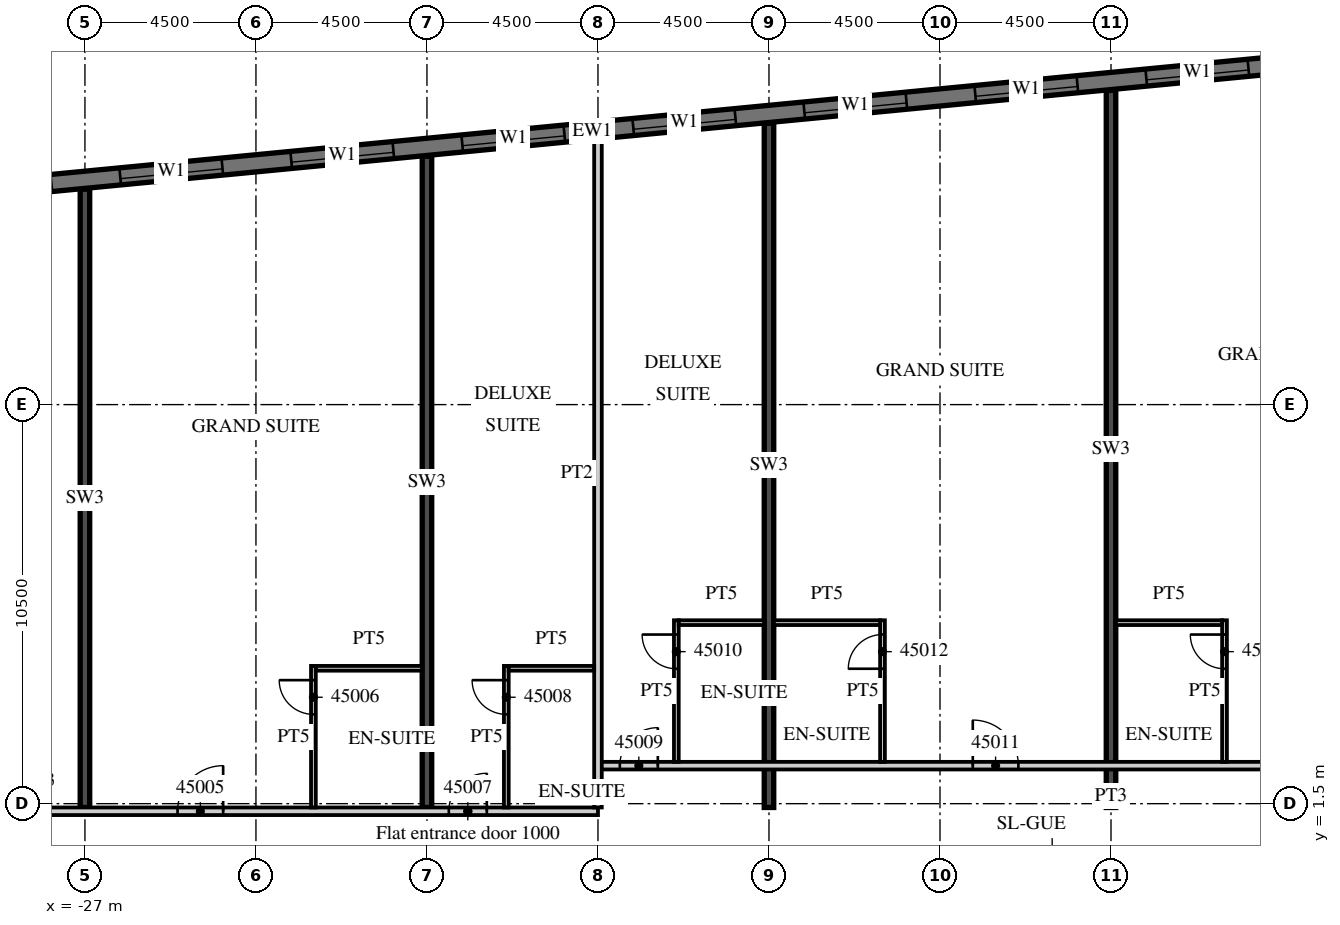
"""IFC4 building model, lengths in metres.
Left out: names, types, materials, properties, quantities, classifications, styles, units other than length and angle.
Written with IfcOpenShell. Run it as: python <this file> out.ifc"""

import sys

from ifc_helpers import new_model, si_unit, direction, frame, frame_2d, origin, place, context, subcontext, project, spatial, rectangle, extrude, element, fill, save


model = new_model("IFC4")
c1 = context("Model", 3, precision=1e-05, world=origin(), true_north=direction((0.0, 1.0)))
c2 = subcontext(c1, "Body", "Model", "MODEL_VIEW")
j1 = project(units=[si_unit("LENGTHUNIT", "METRE"), si_unit("PLANEANGLEUNIT", "RADIAN")], contexts=[c1])
p1 = place(None, origin())
s1 = spatial("IfcSite", under=j1, at=p1, CompositionType="ELEMENT")
p2 = place(p1, origin())
s2 = spatial("IfcBuilding", under=s1, at=p2, CompositionType="ELEMENT")
p3 = place(p2, frame((0.0, 0.0, 190.0)))
s3 = spatial("IfcBuildingStorey", under=s2, at=p3, CompositionType="ELEMENT", Elevation=190.0)
p4 = place(p3, frame((-27.0, 1.4, 0.0), z_axis=(0.0, 0.0, 1.0), x_axis=(0.0, 1.0, 0.0)))
e1 = element("IfcWall", 1, at=p4, inside=s3, PredefinedType="SHEAR", context=c2, shape_type="SweptSolid", body=[
    extrude(rectangle(XDim=16.268, YDim=0.25, at=frame_2d((8.134, 0.0))), origin(), (0.0, 0.0, 1.0), 3.3),
])
p5 = place(p3, frame((-18.0, 1.4, 0.0), z_axis=(0.0, 0.0, 1.0), x_axis=(0.0, 1.0, 0.0)))
e2 = element("IfcWall", 2, at=p5, inside=s3, PredefinedType="SHEAR", context=c2, shape_type="SweptSolid", body=[
    extrude(rectangle(XDim=17.134, YDim=0.25, at=frame_2d((8.567, 0.0))), origin(), (0.0, 0.0, 1.0), 3.3),
])
p6 = place(p3, frame((-9.0, 1.4, 0.0), z_axis=(0.0, 0.0, 1.0), x_axis=(0.0, 1.0, 0.0)))
e3 = element("IfcWall", 3, at=p6, inside=s3, PredefinedType="SHEAR", context=c2, shape_type="SweptSolid", body=[
    extrude(rectangle(XDim=18.001, YDim=0.25, at=frame_2d((9.0, 0.0))), origin(), (0.0, 0.0, 1.0), 3.3),
])
p7 = place(p3, frame((0.0, 1.4, 0.0), z_axis=(0.0, 0.0, 1.0), x_axis=(0.0, 1.0, 0.0)))
e4 = element("IfcWall", 4, at=p7, inside=s3, PredefinedType="SHEAR", context=c2, shape_type="SweptSolid", body=[
    extrude(rectangle(XDim=18.867, YDim=0.25, at=frame_2d((9.434, 0.0))), origin(), (0.0, 0.0, 1.0), 3.3),
])
p8 = place(p3, frame((13.521, 21.817, 0.0), z_axis=(0.0, 0.0, 1.0), x_axis=(-0.995396508751, -0.095842529008, 0.0)))
e5 = element("IfcWall", 5, at=p8, inside=s3, PredefinedType="SOLIDWALL", context=c2, shape_type="SweptSolid", body=[
    extrude(rectangle(XDim=54.591, YDim=0.45, at=frame_2d((27.296, 0.0))), origin(), (0.0, 0.0, 1.0), 3.02),
])
p9 = place(p8, frame((0.91, 0.0, 0.45)))
e6 = element("IfcOpeningElement", 6, at=p9, cuts=e5, PredefinedType="OPENING", context=c2, shape_type="SweptSolid", body=[
    extrude(rectangle(XDim=2.7, YDim=2.25, at=frame_2d((1.35, 1.125))), frame((0.0, 0.235, 0.0), z_axis=(0.0, -1.0, 0.0), x_axis=(1.0, 0.0, 0.0)), (0.0, 0.0, 1.0), 0.47),
])
p10 = place(p8, frame((5.431, 0.0, 0.45)))
e7 = element("IfcOpeningElement", 7, at=p10, cuts=e5, PredefinedType="OPENING", context=c2, shape_type="SweptSolid", body=[
    extrude(rectangle(XDim=2.7, YDim=2.25, at=frame_2d((1.35, 1.125))), frame((0.0, 0.235, 0.0), z_axis=(0.0, -1.0, 0.0), x_axis=(1.0, 0.0, 0.0)), (0.0, 0.0, 1.0), 0.47),
])
p11 = place(p8, frame((9.952, 0.0, 0.45)))
e8 = element("IfcOpeningElement", 8, at=p11, cuts=e5, PredefinedType="OPENING", context=c2, shape_type="SweptSolid", body=[
    extrude(rectangle(XDim=2.7, YDim=2.25, at=frame_2d((1.35, 1.125))), frame((0.0, 0.235, 0.0), z_axis=(0.0, -1.0, 0.0), x_axis=(1.0, 0.0, 0.0)), (0.0, 0.0, 1.0), 0.47),
])
p12 = place(p8, frame((14.473, 0.0, 0.45)))
e9 = element("IfcOpeningElement", 9, at=p12, cuts=e5, PredefinedType="OPENING", context=c2, shape_type="SweptSolid", body=[
    extrude(rectangle(XDim=2.7, YDim=2.25, at=frame_2d((1.35, 1.125))), frame((0.0, 0.235, 0.0), z_axis=(0.0, -1.0, 0.0), x_axis=(1.0, 0.0, 0.0)), (0.0, 0.0, 1.0), 0.47),
])
p13 = place(p8, frame((18.994, 0.0, 0.45)))
e10 = element("IfcOpeningElement", 10, at=p13, cuts=e5, PredefinedType="OPENING", context=c2, shape_type="SweptSolid", body=[
    extrude(rectangle(XDim=2.7, YDim=2.25, at=frame_2d((1.35, 1.125))), frame((0.0, 0.235, 0.0), z_axis=(0.0, -1.0, 0.0), x_axis=(1.0, 0.0, 0.0)), (0.0, 0.0, 1.0), 0.47),
])
p14 = place(p8, frame((23.514, 0.0, 0.45)))
e11 = element("IfcOpeningElement", 11, at=p14, cuts=e5, PredefinedType="OPENING", context=c2, shape_type="SweptSolid", body=[
    extrude(rectangle(XDim=2.7, YDim=2.25, at=frame_2d((1.35, 1.125))), frame((0.0, 0.235, 0.0), z_axis=(0.0, -1.0, 0.0), x_axis=(1.0, 0.0, 0.0)), (0.0, 0.0, 1.0), 0.47),
])
p15 = place(p8, frame((28.035, 0.0, 0.45)))
e12 = element("IfcOpeningElement", 12, at=p15, cuts=e5, PredefinedType="OPENING", context=c2, shape_type="SweptSolid", body=[
    extrude(rectangle(XDim=2.7, YDim=2.25, at=frame_2d((1.35, 1.125))), frame((0.0, 0.235, 0.0), z_axis=(0.0, -1.0, 0.0), x_axis=(1.0, 0.0, 0.0)), (0.0, 0.0, 1.0), 0.47),
])
p16 = place(p8, frame((32.556, 0.0, 0.45)))
e13 = element("IfcOpeningElement", 13, at=p16, cuts=e5, PredefinedType="OPENING", context=c2, shape_type="SweptSolid", body=[
    extrude(rectangle(XDim=2.7, YDim=2.25, at=frame_2d((1.35, 1.125))), frame((0.0, 0.235, 0.0), z_axis=(0.0, -1.0, 0.0), x_axis=(1.0, 0.0, 0.0)), (0.0, 0.0, 1.0), 0.47),
])
p17 = place(p8, frame((37.077, 0.0, 0.45)))
e14 = element("IfcOpeningElement", 14, at=p17, cuts=e5, PredefinedType="OPENING", context=c2, shape_type="SweptSolid", body=[
    extrude(rectangle(XDim=2.7, YDim=2.25, at=frame_2d((1.35, 1.125))), frame((0.0, 0.235, 0.0), z_axis=(0.0, -1.0, 0.0), x_axis=(1.0, 0.0, 0.0)), (0.0, 0.0, 1.0), 0.47),
])
p18 = place(p8, frame((41.598, 0.0, 0.45)))
e15 = element("IfcOpeningElement", 15, at=p18, cuts=e5, PredefinedType="OPENING", context=c2, shape_type="SweptSolid", body=[
    extrude(rectangle(XDim=2.7, YDim=2.25, at=frame_2d((1.35, 1.125))), frame((0.0, 0.235, 0.0), z_axis=(0.0, -1.0, 0.0), x_axis=(1.0, 0.0, 0.0)), (0.0, 0.0, 1.0), 0.47),
])
p19 = place(p8, frame((46.118, 0.0, 0.45)))
e16 = element("IfcOpeningElement", 16, at=p19, cuts=e5, PredefinedType="OPENING", context=c2, shape_type="SweptSolid", body=[
    extrude(rectangle(XDim=2.7, YDim=2.25, at=frame_2d((1.35, 1.125))), frame((0.0, 0.235, 0.0), z_axis=(0.0, -1.0, 0.0), x_axis=(1.0, 0.0, 0.0)), (0.0, 0.0, 1.0), 0.47),
])
p20 = place(p8, frame((50.629, 0.0, 0.45)))
e17 = element("IfcOpeningElement", 17, at=p20, cuts=e5, PredefinedType="OPENING", context=c2, shape_type="SweptSolid", body=[
    extrude(rectangle(XDim=2.7, YDim=2.25, at=frame_2d((1.35, 1.125))), frame((0.0, 0.235, 0.0), z_axis=(0.0, -1.0, 0.0), x_axis=(1.0, 0.0, 0.0)), (0.0, 0.0, 1.0), 0.47),
])
p21 = place(p3, frame((-42.913, 1.3, 0.0), z_axis=(0.0, 0.0, 1.0), x_axis=(1.0, 0.0, 0.0)))
e18 = element("IfcWall", 18, at=p21, inside=s3, PredefinedType="PARTITIONING", context=c2, shape_type="SweptSolid", body=[
    extrude(rectangle(XDim=29.413, YDim=0.2, at=frame_2d((14.707, 0.0))), origin(), (0.0, 0.0, 1.0), 3.02),
])
p22 = place(p21, frame((1.406, 0.0, 0.0)))
e19 = element("IfcOpeningElement", 19, at=p22, cuts=e18, PredefinedType="OPENING", context=c2, shape_type="SweptSolid", body=[
    extrude(rectangle(XDim=1.2, YDim=2.1, at=frame_2d((0.6, 1.05))), frame((0.0, 0.11, 0.0), z_axis=(0.0, -1.0, 0.0), x_axis=(1.0, 0.0, 0.0)), (0.0, 0.0, 1.0), 0.22),
])
p23 = place(p21, frame((12.275, 0.0, 0.0)))
e20 = element("IfcOpeningElement", 20, at=p23, cuts=e18, PredefinedType="OPENING", context=c2, shape_type="SweptSolid", body=[
    extrude(rectangle(XDim=1.2, YDim=2.1, at=frame_2d((0.6, 1.05))), frame((0.0, 0.11, 0.0), z_axis=(0.0, -1.0, 0.0), x_axis=(1.0, 0.0, 0.0)), (0.0, 0.0, 1.0), 0.22),
])
p24 = place(p21, frame((18.35, 0.0, 0.0)))
e21 = element("IfcOpeningElement", 21, at=p24, cuts=e18, PredefinedType="OPENING", context=c2, shape_type="SweptSolid", body=[
    extrude(rectangle(XDim=1.2, YDim=2.1, at=frame_2d((0.6, 1.05))), frame((0.0, 0.11, 0.0), z_axis=(0.0, -1.0, 0.0), x_axis=(1.0, 0.0, 0.0)), (0.0, 0.0, 1.0), 0.22),
])
p25 = place(p21, frame((25.488, 0.0, 0.0)))
e22 = element("IfcOpeningElement", 22, at=p25, cuts=e18, PredefinedType="OPENING", context=c2, shape_type="SweptSolid", body=[
    extrude(rectangle(XDim=1.0, YDim=2.1, at=frame_2d((0.5, 1.05))), frame((0.0, 0.11, 0.0), z_axis=(0.0, -1.0, 0.0), x_axis=(1.0, 0.0, 0.0)), (0.0, 0.0, 1.0), 0.22),
])
p26 = place(p3, frame((-13.5, 2.5, 0.0), z_axis=(0.0, 0.0, 1.0), x_axis=(1.0, 0.0, 0.0)))
e23 = element("IfcWall", 23, at=p26, inside=s3, PredefinedType="PARTITIONING", context=c2, shape_type="SweptSolid", body=[
    extrude(rectangle(XDim=27.0, YDim=0.2, at=frame_2d((13.5, 0.0))), origin(), (0.0, 0.0, 1.0), 3.02),
])
p27 = place(p26, frame((0.575, 0.0, 0.0)))
e24 = element("IfcOpeningElement", 24, at=p27, cuts=e23, PredefinedType="OPENING", context=c2, shape_type="SweptSolid", body=[
    extrude(rectangle(XDim=1.0, YDim=2.1, at=frame_2d((0.5, 1.05))), frame((0.0, 0.11, 0.0), z_axis=(0.0, -1.0, 0.0), x_axis=(1.0, 0.0, 0.0)), (0.0, 0.0, 1.0), 0.22),
])
p28 = place(p26, frame((9.863, 0.0, 0.0)))
e25 = element("IfcOpeningElement", 25, at=p28, cuts=e23, PredefinedType="OPENING", context=c2, shape_type="SweptSolid", body=[
    extrude(rectangle(XDim=1.2, YDim=2.1, at=frame_2d((0.6, 1.05))), frame((0.0, 0.11, 0.0), z_axis=(0.0, -1.0, 0.0), x_axis=(1.0, 0.0, 0.0)), (0.0, 0.0, 1.0), 0.22),
])
p29 = place(p26, frame((18.862, 0.0, 0.0)))
e26 = element("IfcOpeningElement", 26, at=p29, cuts=e23, PredefinedType="OPENING", context=c2, shape_type="SweptSolid", body=[
    extrude(rectangle(XDim=1.2, YDim=2.1, at=frame_2d((0.6, 1.05))), frame((0.0, 0.11, 0.0), z_axis=(0.0, -1.0, 0.0), x_axis=(1.0, 0.0, 0.0)), (0.0, 0.0, 1.0), 0.22),
])
p30 = place(p26, frame((25.425, 0.0, 0.0)))
e27 = element("IfcOpeningElement", 27, at=p30, cuts=e23, PredefinedType="OPENING", context=c2, shape_type="SweptSolid", body=[
    extrude(rectangle(XDim=1.0, YDim=2.1, at=frame_2d((0.5, 1.05))), frame((0.0, 0.11, 0.0), z_axis=(0.0, -1.0, 0.0), x_axis=(1.0, 0.0, 0.0)), (0.0, 0.0, 1.0), 0.22),
])
p31 = place(p3, frame((-20.988, 1.4, 0.0), z_axis=(0.0, 0.0, 1.0), x_axis=(0.0, 1.0, 0.0)))
e28 = element("IfcWall", 28, at=p31, inside=s3, PredefinedType="PARTITIONING", context=c2, shape_type="SweptSolid", body=[
    extrude(rectangle(XDim=3.725, YDim=0.125, at=frame_2d((1.863, 0.0))), origin(), (0.0, 0.0, 1.0), 3.02),
])
p32 = place(p31, frame((2.45, 0.0, 0.0)))
e29 = element("IfcOpeningElement", 29, at=p32, cuts=e28, PredefinedType="OPENING", context=c2, shape_type="SweptSolid", body=[
    extrude(rectangle(XDim=0.9, YDim=2.1, at=frame_2d((0.45, 1.05))), frame((0.0, 0.073, 0.0), z_axis=(0.0, -1.0, 0.0), x_axis=(1.0, 0.0, 0.0)), (0.0, 0.0, 1.0), 0.145),
])
p33 = place(p3, frame((-20.925, 5.062, 0.0), z_axis=(0.0, 0.0, 1.0), x_axis=(1.0, 0.0, 0.0)))
e30 = element("IfcWall", 30, at=p33, inside=s3, PredefinedType="PARTITIONING", context=c2, shape_type="SweptSolid", body=[
    extrude(rectangle(XDim=2.8, YDim=0.125, at=frame_2d((1.4, 0.0))), origin(), (0.0, 0.0, 1.0), 3.02),
])
p34 = place(p3, frame((-13.5, 1.4, 0.0), z_axis=(0.0, 0.0, 1.0), x_axis=(0.0, 1.0, 0.0)))
e31 = element("IfcWall", 31, at=p34, inside=s3, PredefinedType="PARTITIONING", context=c2, shape_type="SweptSolid", body=[
    extrude(rectangle(XDim=17.59, YDim=0.2, at=frame_2d((8.795, 0.0))), origin(), (0.0, 0.0, 1.0), 3.02),
])
p35 = place(p3, frame((-15.912, 1.4, 0.0), z_axis=(0.0, 0.0, 1.0), x_axis=(0.0, 1.0, 0.0)))
e32 = element("IfcWall", 32, at=p35, inside=s3, PredefinedType="PARTITIONING", context=c2, shape_type="SweptSolid", body=[
    extrude(rectangle(XDim=3.725, YDim=0.125, at=frame_2d((1.863, 0.0))), origin(), (0.0, 0.0, 1.0), 3.02),
])
p36 = place(p35, frame((2.45, 0.0, 0.0)))
e33 = element("IfcOpeningElement", 33, at=p36, cuts=e32, PredefinedType="OPENING", context=c2, shape_type="SweptSolid", body=[
    extrude(rectangle(XDim=0.9, YDim=2.1, at=frame_2d((0.45, 1.05))), frame((0.0, 0.073, 0.0), z_axis=(0.0, -1.0, 0.0), x_axis=(1.0, 0.0, 0.0)), (0.0, 0.0, 1.0), 0.145),
])
p37 = place(p3, frame((-15.85, 5.062, 0.0), z_axis=(0.0, 0.0, 1.0), x_axis=(1.0, 0.0, 0.0)))
e34 = element("IfcWall", 34, at=p37, inside=s3, PredefinedType="PARTITIONING", context=c2, shape_type="SweptSolid", body=[
    extrude(rectangle(XDim=2.25, YDim=0.125, at=frame_2d((1.125, 0.0))), origin(), (0.0, 0.0, 1.0), 3.02),
])
p38 = place(p3, frame((-11.438, 2.6, 0.0), z_axis=(0.0, 0.0, 1.0), x_axis=(0.0, 1.0, 0.0)))
e35 = element("IfcWall", 35, at=p38, inside=s3, PredefinedType="PARTITIONING", context=c2, shape_type="SweptSolid", body=[
    extrude(rectangle(XDim=3.725, YDim=0.125, at=frame_2d((1.862, 0.0))), origin(), (0.0, 0.0, 1.0), 3.02),
])
p39 = place(p38, frame((2.45, 0.0, 0.0)))
e36 = element("IfcOpeningElement", 36, at=p39, cuts=e35, PredefinedType="OPENING", context=c2, shape_type="SweptSolid", body=[
    extrude(rectangle(XDim=0.9, YDim=2.1, at=frame_2d((0.45, 1.05))), frame((0.0, 0.073, 0.0), z_axis=(0.0, -1.0, 0.0), x_axis=(1.0, 0.0, 0.0)), (0.0, 0.0, 1.0), 0.145),
])
p40 = place(p3, frame((-11.375, 6.263, 0.0), z_axis=(0.0, 0.0, 1.0), x_axis=(1.0, 0.0, 0.0)))
e37 = element("IfcWall", 37, at=p40, inside=s3, PredefinedType="PARTITIONING", context=c2, shape_type="SweptSolid", body=[
    extrude(rectangle(XDim=2.25, YDim=0.125, at=frame_2d((1.125, 0.0))), origin(), (0.0, 0.0, 1.0), 3.02),
])
p41 = place(p3, frame((-6.013, 2.6, 0.0), z_axis=(0.0, 0.0, 1.0), x_axis=(0.0, 1.0, 0.0)))
e38 = element("IfcWall", 38, at=p41, inside=s3, PredefinedType="PARTITIONING", context=c2, shape_type="SweptSolid", body=[
    extrude(rectangle(XDim=3.725, YDim=0.125, at=frame_2d((1.862, 0.0))), origin(), (0.0, 0.0, 1.0), 3.02),
])
p42 = place(p41, frame((2.45, 0.0, 0.0)))
e39 = element("IfcOpeningElement", 39, at=p42, cuts=e38, PredefinedType="OPENING", context=c2, shape_type="SweptSolid", body=[
    extrude(rectangle(XDim=0.9, YDim=2.1, at=frame_2d((0.45, 1.05))), frame((0.0, 0.073, 0.0), z_axis=(0.0, -1.0, 0.0), x_axis=(1.0, 0.0, 0.0)), (0.0, 0.0, 1.0), 0.145),
])
p43 = place(p3, frame((-8.875, 6.263, 0.0), z_axis=(0.0, 0.0, 1.0), x_axis=(1.0, 0.0, 0.0)))
e40 = element("IfcWall", 40, at=p43, inside=s3, PredefinedType="PARTITIONING", context=c2, shape_type="SweptSolid", body=[
    extrude(rectangle(XDim=2.8, YDim=0.125, at=frame_2d((1.4, 0.0))), origin(), (0.0, 0.0, 1.0), 3.02),
])
p44 = place(p3, frame((2.987, 2.6, 0.0), z_axis=(0.0, 0.0, 1.0), x_axis=(0.0, 1.0, 0.0)))
e41 = element("IfcWall", 41, at=p44, inside=s3, PredefinedType="PARTITIONING", context=c2, shape_type="SweptSolid", body=[
    extrude(rectangle(XDim=3.725, YDim=0.125, at=frame_2d((1.862, 0.0))), origin(), (0.0, 0.0, 1.0), 3.02),
])
p45 = place(p44, frame((2.45, 0.0, 0.0)))
e42 = element("IfcOpeningElement", 42, at=p45, cuts=e41, PredefinedType="OPENING", context=c2, shape_type="SweptSolid", body=[
    extrude(rectangle(XDim=0.9, YDim=2.1, at=frame_2d((0.45, 1.05))), frame((0.0, 0.073, 0.0), z_axis=(0.0, -1.0, 0.0), x_axis=(1.0, 0.0, 0.0)), (0.0, 0.0, 1.0), 0.145),
])
p46 = place(p3, frame((0.125, 6.263, 0.0), z_axis=(0.0, 0.0, 1.0), x_axis=(1.0, 0.0, 0.0)))
e43 = element("IfcWall", 43, at=p46, inside=s3, PredefinedType="PARTITIONING", context=c2, shape_type="SweptSolid", body=[
    extrude(rectangle(XDim=2.8, YDim=0.125, at=frame_2d((1.4, 0.0))), origin(), (0.0, 0.0, 1.0), 3.02),
])
p47 = place(p11, origin())
e44 = element("IfcWindow", 44, at=p47, inside=s3, PartitioningType="SINGLE_PANEL", PredefinedType="WINDOW", context=c2, shape_type="SweptSolid", body=[
    extrude(rectangle(XDim=2.7, YDim=2.25, at=frame_2d((1.35, 1.125))), frame((0.0, 0.09, 0.0), z_axis=(0.0, -1.0, 0.0), x_axis=(1.0, 0.0, 0.0)), (0.0, 0.0, 1.0), 0.06),
])
fill(e8, e44)
p48 = place(p12, origin())
e45 = element("IfcWindow", 45, at=p48, inside=s3, PartitioningType="SINGLE_PANEL", PredefinedType="WINDOW", context=c2, shape_type="SweptSolid", body=[
    extrude(rectangle(XDim=2.7, YDim=2.25, at=frame_2d((1.35, 1.125))), frame((0.0, 0.09, 0.0), z_axis=(0.0, -1.0, 0.0), x_axis=(1.0, 0.0, 0.0)), (0.0, 0.0, 1.0), 0.06),
])
fill(e9, e45)
p49 = place(p13, origin())
e46 = element("IfcWindow", 46, at=p49, inside=s3, PartitioningType="SINGLE_PANEL", PredefinedType="WINDOW", context=c2, shape_type="SweptSolid", body=[
    extrude(rectangle(XDim=2.7, YDim=2.25, at=frame_2d((1.35, 1.125))), frame((0.0, 0.09, 0.0), z_axis=(0.0, -1.0, 0.0), x_axis=(1.0, 0.0, 0.0)), (0.0, 0.0, 1.0), 0.06),
])
fill(e10, e46)
p50 = place(p14, origin())
e47 = element("IfcWindow", 47, at=p50, inside=s3, PartitioningType="SINGLE_PANEL", PredefinedType="WINDOW", context=c2, shape_type="SweptSolid", body=[
    extrude(rectangle(XDim=2.7, YDim=2.25, at=frame_2d((1.35, 1.125))), frame((0.0, 0.09, 0.0), z_axis=(0.0, -1.0, 0.0), x_axis=(1.0, 0.0, 0.0)), (0.0, 0.0, 1.0), 0.06),
])
fill(e11, e47)
p51 = place(p15, origin())
e48 = element("IfcWindow", 48, at=p51, inside=s3, PartitioningType="SINGLE_PANEL", PredefinedType="WINDOW", context=c2, shape_type="SweptSolid", body=[
    extrude(rectangle(XDim=2.7, YDim=2.25, at=frame_2d((1.35, 1.125))), frame((0.0, 0.09, 0.0), z_axis=(0.0, -1.0, 0.0), x_axis=(1.0, 0.0, 0.0)), (0.0, 0.0, 1.0), 0.06),
])
fill(e12, e48)
p52 = place(p16, origin())
e49 = element("IfcWindow", 49, at=p52, inside=s3, PartitioningType="SINGLE_PANEL", PredefinedType="WINDOW", context=c2, shape_type="SweptSolid", body=[
    extrude(rectangle(XDim=2.7, YDim=2.25, at=frame_2d((1.35, 1.125))), frame((0.0, 0.09, 0.0), z_axis=(0.0, -1.0, 0.0), x_axis=(1.0, 0.0, 0.0)), (0.0, 0.0, 1.0), 0.06),
])
fill(e13, e49)
p53 = place(p17, origin())
e50 = element("IfcWindow", 50, at=p53, inside=s3, PartitioningType="SINGLE_PANEL", PredefinedType="WINDOW", context=c2, shape_type="SweptSolid", body=[
    extrude(rectangle(XDim=2.7, YDim=2.25, at=frame_2d((1.35, 1.125))), frame((0.0, 0.09, 0.0), z_axis=(0.0, -1.0, 0.0), x_axis=(1.0, 0.0, 0.0)), (0.0, 0.0, 1.0), 0.06),
])
fill(e14, e50)
p54 = place(p24, origin())
e51 = element("IfcDoor", 51, at=p54, inside=s3, OperationType="SINGLE_SWING_RIGHT", PredefinedType="DOOR", context=c2, shape_type="SweptSolid", body=[
    extrude(rectangle(XDim=1.2, YDim=2.1, at=frame_2d((0.6, 1.05))), frame((0.0, 0.025, 0.0), z_axis=(0.0, -1.0, 0.0), x_axis=(1.0, 0.0, 0.0)), (0.0, 0.0, 1.0), 0.05),
])
fill(e21, e51)
p55 = place(p32, origin())
e52 = element("IfcDoor", 52, at=p55, inside=s3, OperationType="SINGLE_SWING_RIGHT", PredefinedType="DOOR", context=c2, shape_type="SweptSolid", body=[
    extrude(rectangle(XDim=0.9, YDim=2.1, at=frame_2d((0.45, 1.05))), frame((0.0, 0.025, 0.0), z_axis=(0.0, -1.0, 0.0), x_axis=(1.0, 0.0, 0.0)), (0.0, 0.0, 1.0), 0.05),
])
fill(e29, e52)
p56 = place(p25, origin())
e53 = element("IfcDoor", 53, at=p56, inside=s3, OperationType="SINGLE_SWING_RIGHT", PredefinedType="DOOR", context=c2, shape_type="SweptSolid", body=[
    extrude(rectangle(XDim=1.0, YDim=2.1, at=frame_2d((0.5, 1.05))), frame((0.0, 0.025, 0.0), z_axis=(0.0, -1.0, 0.0), x_axis=(1.0, 0.0, 0.0)), (0.0, 0.0, 1.0), 0.05),
])
fill(e22, e53)
p57 = place(p36, origin())
e54 = element("IfcDoor", 54, at=p57, inside=s3, OperationType="SINGLE_SWING_RIGHT", PredefinedType="DOOR", context=c2, shape_type="SweptSolid", body=[
    extrude(rectangle(XDim=0.9, YDim=2.1, at=frame_2d((0.45, 1.05))), frame((0.0, 0.025, 0.0), z_axis=(0.0, -1.0, 0.0), x_axis=(1.0, 0.0, 0.0)), (0.0, 0.0, 1.0), 0.05),
])
fill(e33, e54)
p58 = place(p27, origin())
e55 = element("IfcDoor", 55, at=p58, inside=s3, OperationType="SINGLE_SWING_RIGHT", PredefinedType="DOOR", context=c2, shape_type="SweptSolid", body=[
    extrude(rectangle(XDim=1.0, YDim=2.1, at=frame_2d((0.5, 1.05))), frame((0.0, 0.025, 0.0), z_axis=(0.0, -1.0, 0.0), x_axis=(1.0, 0.0, 0.0)), (0.0, 0.0, 1.0), 0.05),
])
fill(e24, e55)
p59 = place(p39, origin())
e56 = element("IfcDoor", 56, at=p59, inside=s3, OperationType="SINGLE_SWING_RIGHT", PredefinedType="DOOR", context=c2, shape_type="SweptSolid", body=[
    extrude(rectangle(XDim=0.9, YDim=2.1, at=frame_2d((0.45, 1.05))), frame((0.0, 0.025, 0.0), z_axis=(0.0, -1.0, 0.0), x_axis=(1.0, 0.0, 0.0)), (0.0, 0.0, 1.0), 0.05),
])
fill(e36, e56)
p60 = place(p28, origin())
e57 = element("IfcDoor", 57, at=p60, inside=s3, OperationType="SINGLE_SWING_LEFT", PredefinedType="DOOR", context=c2, shape_type="SweptSolid", body=[
    extrude(rectangle(XDim=1.2, YDim=2.1, at=frame_2d((0.6, 1.05))), frame((0.0, 0.025, 0.0), z_axis=(0.0, -1.0, 0.0), x_axis=(1.0, 0.0, 0.0)), (0.0, 0.0, 1.0), 0.05),
])
fill(e25, e57)
p61 = place(p42, origin())
e58 = element("IfcDoor", 58, at=p61, inside=s3, OperationType="SINGLE_SWING_LEFT", PredefinedType="DOOR", context=c2, shape_type="SweptSolid", body=[
    extrude(rectangle(XDim=0.9, YDim=2.1, at=frame_2d((0.45, 1.05))), frame((0.0, 0.025, 0.0), z_axis=(0.0, -1.0, 0.0), x_axis=(1.0, 0.0, 0.0)), (0.0, 0.0, 1.0), 0.05),
])
fill(e39, e58)
p62 = place(p45, origin())
e59 = element("IfcDoor", 59, at=p62, inside=s3, OperationType="SINGLE_SWING_RIGHT", PredefinedType="DOOR", context=c2, shape_type="SweptSolid", body=[
    extrude(rectangle(XDim=0.9, YDim=2.1, at=frame_2d((0.45, 1.05))), frame((0.0, 0.025, 0.0), z_axis=(0.0, -1.0, 0.0), x_axis=(1.0, 0.0, 0.0)), (0.0, 0.0, 1.0), 0.05),
])
fill(e42, e59)
save(model, sys.argv[1])
